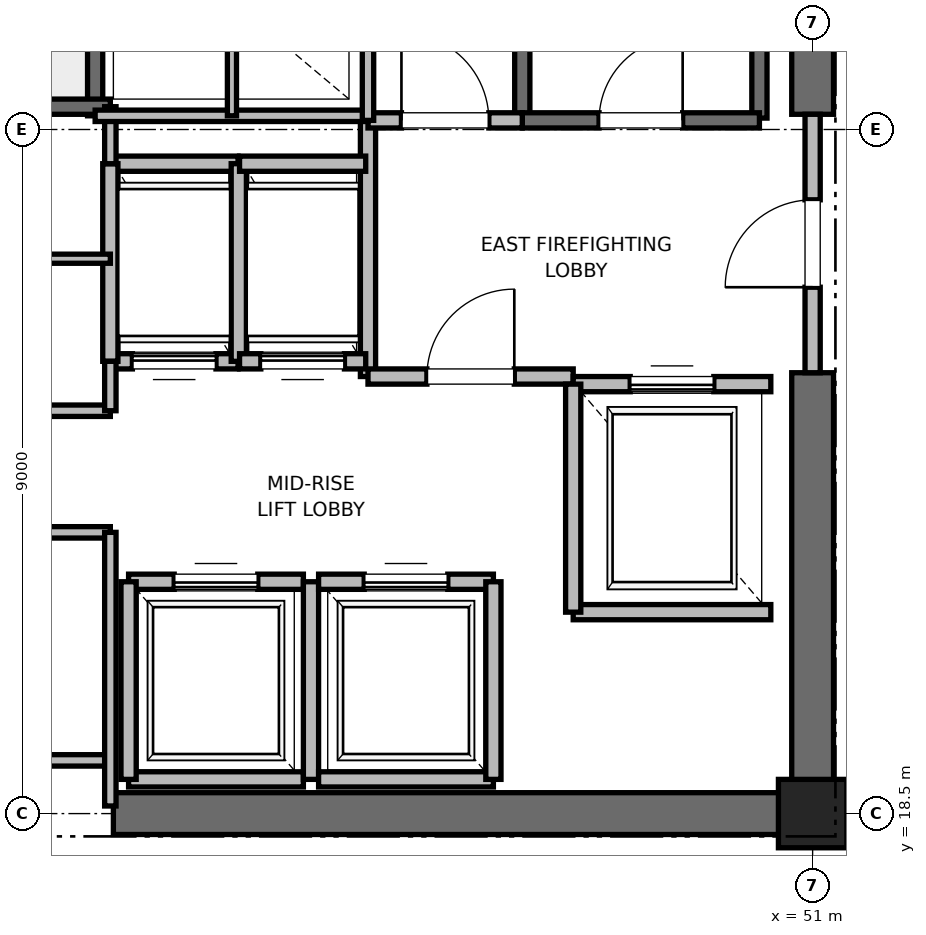
"""IFC4 building model, lengths in metres.
Left out: names, types, materials, properties, quantities, classifications, styles, units other than length and angle.
Written with IfcOpenShell. Run it as: python <this file> out.ifc"""

import sys

from ifc_helpers import new_model, si_unit, direction, frame, frame_2d, origin, origin_2d, place, context, subcontext, project, spatial, rectangle, extrude, element, fill, save


model = new_model("IFC4")
c1 = context("Model", 3, precision=1e-05, world=origin(), true_north=direction((0.0, 1.0)))
c2 = subcontext(c1, "Body", "Model", "MODEL_VIEW")
j1 = project(units=[si_unit("LENGTHUNIT", "METRE"), si_unit("PLANEANGLEUNIT", "RADIAN")], contexts=[c1])
p1 = place(None, origin())
s1 = spatial("IfcSite", under=j1, at=p1, CompositionType="ELEMENT")
p2 = place(p1, origin())
s2 = spatial("IfcBuilding", under=s1, at=p2, CompositionType="ELEMENT")
p3 = place(p2, frame((0.0, 0.0, 189.4)))
s3 = spatial("IfcBuildingStorey", under=s2, at=p3, CompositionType="ELEMENT", Elevation=189.4)
p4 = place(p3, frame((51.0, 18.5, 0.0), z_axis=(0.0, 0.0, 1.0), x_axis=(1.0, 0.0, 0.0)))
e1 = element("IfcColumn", 1, at=p4, inside=s3, PredefinedType="PILASTER", context=c2, shape_type="SweptSolid", body=[
    extrude(rectangle(XDim=0.9, YDim=0.9, at=origin_2d()), origin(), (0.0, 0.0, 1.0), 5.4),
])
p5 = place(p3, frame((41.8, 18.5, 0.0), z_axis=(0.0, 0.0, 1.0), x_axis=(1.0, 0.0, 0.0)))
e2 = element("IfcWall", 2, at=p5, inside=s3, PredefinedType="SHEAR", context=c2, shape_type="SweptSolid", body=[
    extrude(rectangle(XDim=9.2, YDim=0.55, at=frame_2d((4.6, 0.0))), origin(), (0.0, 0.0, 1.0), 5.1),
])
p6 = place(p3, frame((51.0, 18.5, 0.0), z_axis=(0.0, 0.0, 1.0), x_axis=(0.0, 1.0, 0.0)))
e3 = element("IfcWall", 3, at=p6, inside=s3, PredefinedType="SHEAR", context=c2, shape_type="SweptSolid", body=[
    extrude(rectangle(XDim=5.8, YDim=0.55, at=frame_2d((2.9, 0.0))), origin(), (0.0, 0.0, 1.0), 5.1),
])
p7 = place(p3, frame((51.0, 27.7, 0.0), z_axis=(0.0, 0.0, 1.0), x_axis=(0.0, 1.0, 0.0)))
e4 = element("IfcWall", 4, at=p7, inside=s3, PredefinedType="SHEAR", context=c2, shape_type="SweptSolid", body=[
    extrude(rectangle(XDim=8.8, YDim=0.55, at=frame_2d((4.4, 0.0))), origin(), (0.0, 0.0, 1.0), 5.1),
])
p8 = place(p3, frame((50.3, 27.65, 0.0), z_axis=(0.0, 0.0, 1.0), x_axis=(0.0, 1.0, 0.0)))
e5 = element("IfcWall", 5, at=p8, inside=s3, PredefinedType="SOLIDWALL", context=c2, shape_type="SweptSolid", body=[
    extrude(rectangle(XDim=8.15, YDim=0.2, at=frame_2d((4.075, 0.0))), origin(), (0.0, 0.0, 1.0), 5.1),
])
p9 = place(p3, frame((47.18, 27.62, 0.0), z_axis=(0.0, 0.0, 1.0), x_axis=(0.0, 1.0, 0.0)))
e6 = element("IfcWall", 6, at=p9, inside=s3, PredefinedType="SOLIDWALL", context=c2, shape_type="SweptSolid", body=[
    extrude(rectangle(XDim=8.18, YDim=0.2, at=frame_2d((4.09, 0.0))), origin(), (0.0, 0.0, 1.0), 5.1),
])
p10 = place(p3, frame((47.18, 27.62, 0.0), z_axis=(0.0, 0.0, 1.0), x_axis=(1.0, 0.0, 0.0)))
e7 = element("IfcWall", 7, at=p10, inside=s3, PredefinedType="SOLIDWALL", context=c2, shape_type="SweptSolid", body=[
    extrude(rectangle(XDim=3.12, YDim=0.2, at=frame_2d((1.56, 0.0))), origin(), (0.0, 0.0, 1.0), 5.1),
])
p11 = place(p10, frame((1.01, 0.0, 0.0)))
e8 = element("IfcOpeningElement", 8, at=p11, cuts=e7, PredefinedType="OPENING", context=c2, shape_type="SweptSolid", body=[
    extrude(rectangle(XDim=1.1, YDim=2.15, at=frame_2d((0.55, 1.075))), frame((0.0, 0.1, 0.0), z_axis=(0.0, -1.0, 0.0), x_axis=(1.0, 0.0, 0.0)), (0.0, 0.0, 1.0), 0.2),
])
p12 = place(p3, frame((41.56, 27.68, 0.0), z_axis=(0.0, 0.0, 1.0), x_axis=(0.0, 1.0, 0.0)))
e9 = element("IfcWall", 9, at=p12, inside=s3, PredefinedType="SOLIDWALL", context=c2, shape_type="SweptSolid", body=[
    extrude(rectangle(XDim=8.57, YDim=0.2, at=frame_2d((4.285, 0.0))), origin(), (0.0, 0.0, 1.0), 5.1),
])
p13 = place(p3, frame((38.44, 27.8, 0.0), z_axis=(0.0, 0.0, 1.0), x_axis=(1.0, 0.0, 0.0)))
e10 = element("IfcWall", 10, at=p13, inside=s3, PredefinedType="SOLIDWALL", context=c2, shape_type="SweptSolid", body=[
    extrude(rectangle(XDim=3.32, YDim=0.2, at=frame_2d((1.66, 0.0))), origin(), (0.0, 0.0, 1.0), 5.1),
])
p14 = place(p3, frame((45.15, 24.25, 0.0), z_axis=(0.0, 0.0, 1.0), x_axis=(0.0, 1.0, 0.0)))
e11 = element("IfcWall", 11, at=p14, inside=s3, PredefinedType="PARTITIONING", context=c2, shape_type="SweptSolid", body=[
    extrude(rectangle(XDim=3.37, YDim=0.2, at=frame_2d((1.685, 0.0))), origin(), (0.0, 0.0, 1.0), 5.1),
])
p15 = place(p3, frame((45.15, 24.25, 0.0), z_axis=(0.0, 0.0, 1.0), x_axis=(1.0, 0.0, 0.0)))
e12 = element("IfcWall", 12, at=p15, inside=s3, PredefinedType="PARTITIONING", context=c2, shape_type="SweptSolid", body=[
    extrude(rectangle(XDim=2.7, YDim=0.2, at=frame_2d((1.35, 0.0))), origin(), (0.0, 0.0, 1.0), 5.1),
])
p16 = place(p15, frame((0.775, 0.0, 0.0)))
e13 = element("IfcOpeningElement", 13, at=p16, cuts=e12, PredefinedType="OPENING", context=c2, shape_type="SweptSolid", body=[
    extrude(rectangle(XDim=1.15, YDim=2.2, at=frame_2d((0.575, 1.1))), frame((0.0, 0.1, 0.0), z_axis=(0.0, -1.0, 0.0), x_axis=(1.0, 0.0, 0.0)), (0.0, 0.0, 1.0), 0.2),
])
p17 = place(p3, frame((45.15, 27.62, 0.0), z_axis=(0.0, 0.0, 1.0), x_axis=(1.0, 0.0, 0.0)))
e14 = element("IfcWall", 14, at=p17, inside=s3, PredefinedType="PARTITIONING", context=c2, shape_type="SweptSolid", body=[
    extrude(rectangle(XDim=2.03, YDim=0.2, at=frame_2d((1.015, 0.0))), origin(), (0.0, 0.0, 1.0), 5.1),
])
p18 = place(p17, frame((0.44, 0.0, 0.0)))
e15 = element("IfcOpeningElement", 15, at=p18, cuts=e14, PredefinedType="OPENING", context=c2, shape_type="SweptSolid", body=[
    extrude(rectangle(XDim=1.15, YDim=2.2, at=frame_2d((0.575, 1.1))), frame((0.0, 0.1, 0.0), z_axis=(0.0, -1.0, 0.0), x_axis=(1.0, 0.0, 0.0)), (0.0, 0.0, 1.0), 0.2),
])
p19 = place(p3, frame((51.0, 24.3, 0.0), z_axis=(0.0, 0.0, 1.0), x_axis=(0.0, 1.0, 0.0)))
e16 = element("IfcWall", 16, at=p19, inside=s3, PredefinedType="PARTITIONING", context=c2, shape_type="SweptSolid", body=[
    extrude(rectangle(XDim=3.4, YDim=0.2, at=frame_2d((1.7, 0.0))), origin(), (0.0, 0.0, 1.0), 4.08),
])
p20 = place(p19, frame((1.125, 0.0, 0.0)))
e17 = element("IfcOpeningElement", 17, at=p20, cuts=e16, PredefinedType="OPENING", context=c2, shape_type="SweptSolid", body=[
    extrude(rectangle(XDim=1.15, YDim=2.2, at=frame_2d((0.575, 1.1))), frame((0.0, 0.1, 0.0), z_axis=(0.0, -1.0, 0.0), x_axis=(1.0, 0.0, 0.0)), (0.0, 0.0, 1.0), 0.2),
])
p21 = place(p3, frame((47.85, 21.15, 0.0), z_axis=(0.0, 0.0, 1.0), x_axis=(1.0, 0.0, 0.0)))
e18 = element("IfcWall", 18, at=p21, inside=s3, PredefinedType="SOLIDWALL", context=c2, shape_type="SweptSolid", body=[
    extrude(rectangle(XDim=2.6, YDim=0.2, at=frame_2d((1.3, 0.0))), origin(), (0.0, 0.0, 1.0), 5.1),
])
p22 = place(p3, frame((50.45, 24.15, 0.0), z_axis=(0.0, 0.0, 1.0), x_axis=(-1.0, 0.0, 0.0)))
e19 = element("IfcWall", 19, at=p22, inside=s3, PredefinedType="SOLIDWALL", context=c2, shape_type="SweptSolid", body=[
    extrude(rectangle(XDim=2.6, YDim=0.2, at=frame_2d((1.3, 0.0))), origin(), (0.0, 0.0, 1.0), 4.08),
])
p23 = place(p22, frame((0.75, 0.0, 0.0)))
e20 = element("IfcOpeningElement", 20, at=p23, cuts=e19, PredefinedType="OPENING", context=c2, shape_type="SweptSolid", body=[
    extrude(rectangle(XDim=1.1, YDim=2.2, at=frame_2d((0.55, 1.1))), frame((0.0, 0.1, 0.0), z_axis=(0.0, -1.0, 0.0), x_axis=(1.0, 0.0, 0.0)), (0.0, 0.0, 1.0), 0.2),
])
p24 = place(p3, frame((47.85, 24.15, 0.0), z_axis=(0.0, 0.0, 1.0), x_axis=(0.0, -1.0, 0.0)))
e21 = element("IfcWall", 21, at=p24, inside=s3, PredefinedType="SOLIDWALL", context=c2, shape_type="SweptSolid", body=[
    extrude(rectangle(XDim=3.0, YDim=0.2, at=frame_2d((1.5, 0.0))), origin(), (0.0, 0.0, 1.0), 5.1),
])
p25 = place(p3, frame((42.0, 18.95, 0.0), z_axis=(0.0, 0.0, 1.0), x_axis=(1.0, 0.0, 0.0)))
e22 = element("IfcWall", 22, at=p25, inside=s3, PredefinedType="SOLIDWALL", context=c2, shape_type="SweptSolid", body=[
    extrude(rectangle(XDim=2.3, YDim=0.2, at=frame_2d((1.15, 0.0))), origin(), (0.0, 0.0, 1.0), 4.08),
])
p26 = place(p3, frame((44.3, 21.55, 0.0), z_axis=(0.0, 0.0, 1.0), x_axis=(-1.0, 0.0, 0.0)))
e23 = element("IfcWall", 23, at=p26, inside=s3, PredefinedType="SOLIDWALL", context=c2, shape_type="SweptSolid", body=[
    extrude(rectangle(XDim=2.3, YDim=0.2, at=frame_2d((1.15, 0.0))), origin(), (0.0, 0.0, 1.0), 5.1),
])
p27 = place(p26, frame((0.6, 0.0, 0.0)))
e24 = element("IfcOpeningElement", 24, at=p27, cuts=e23, PredefinedType="OPENING", context=c2, shape_type="SweptSolid", body=[
    extrude(rectangle(XDim=1.1, YDim=2.2, at=frame_2d((0.55, 1.1))), frame((0.0, 0.1, 0.0), z_axis=(0.0, -1.0, 0.0), x_axis=(1.0, 0.0, 0.0)), (0.0, 0.0, 1.0), 0.2),
])
p28 = place(p3, frame((42.0, 21.55, 0.0), z_axis=(0.0, 0.0, 1.0), x_axis=(0.0, -1.0, 0.0)))
e25 = element("IfcWall", 25, at=p28, inside=s3, PredefinedType="SOLIDWALL", context=c2, shape_type="SweptSolid", body=[
    extrude(rectangle(XDim=2.6, YDim=0.2, at=frame_2d((1.3, 0.0))), origin(), (0.0, 0.0, 1.0), 4.08),
])
p29 = place(p3, frame((44.4, 18.95, 0.0), z_axis=(0.0, 0.0, 1.0), x_axis=(0.0, 1.0, 0.0)))
e26 = element("IfcWall", 26, at=p29, inside=s3, PredefinedType="SOLIDWALL", context=c2, shape_type="SweptSolid", body=[
    extrude(rectangle(XDim=2.6, YDim=0.2, at=frame_2d((1.3, 0.0))), origin(), (0.0, 0.0, 1.0), 5.1),
])
p30 = place(p3, frame((44.5, 18.95, 0.0), z_axis=(0.0, 0.0, 1.0), x_axis=(1.0, 0.0, 0.0)))
e27 = element("IfcWall", 27, at=p30, inside=s3, PredefinedType="SOLIDWALL", context=c2, shape_type="SweptSolid", body=[
    extrude(rectangle(XDim=2.3, YDim=0.2, at=frame_2d((1.15, 0.0))), origin(), (0.0, 0.0, 1.0), 5.1),
])
p31 = place(p3, frame((46.8, 21.55, 0.0), z_axis=(0.0, 0.0, 1.0), x_axis=(-1.0, 0.0, 0.0)))
e28 = element("IfcWall", 28, at=p31, inside=s3, PredefinedType="SOLIDWALL", context=c2, shape_type="SweptSolid", body=[
    extrude(rectangle(XDim=2.3, YDim=0.2, at=frame_2d((1.15, 0.0))), origin(), (0.0, 0.0, 1.0), 5.1),
])
p32 = place(p31, frame((0.6, 0.0, 0.0)))
e29 = element("IfcOpeningElement", 29, at=p32, cuts=e28, PredefinedType="OPENING", context=c2, shape_type="SweptSolid", body=[
    extrude(rectangle(XDim=1.1, YDim=2.2, at=frame_2d((0.55, 1.1))), frame((0.0, 0.1, 0.0), z_axis=(0.0, -1.0, 0.0), x_axis=(1.0, 0.0, 0.0)), (0.0, 0.0, 1.0), 0.2),
])
p33 = place(p3, frame((46.8, 18.95, 0.0), z_axis=(0.0, 0.0, 1.0), x_axis=(0.0, 1.0, 0.0)))
e30 = element("IfcWall", 30, at=p33, inside=s3, PredefinedType="SOLIDWALL", context=c2, shape_type="SweptSolid", body=[
    extrude(rectangle(XDim=2.6, YDim=0.2, at=frame_2d((1.3, 0.0))), origin(), (0.0, 0.0, 1.0), 5.1),
])
p34 = place(p3, frame((41.76, 24.45, 0.0), z_axis=(0.0, 0.0, 1.0), x_axis=(1.0, 0.0, 0.0)))
e31 = element("IfcWall", 31, at=p34, inside=s3, PredefinedType="SOLIDWALL", context=c2, shape_type="SweptSolid", body=[
    extrude(rectangle(XDim=1.68, YDim=0.2, at=frame_2d((0.84, 0.0))), origin(), (0.0, 0.0, 1.0), 5.1),
])
p35 = place(p34, frame((0.29, 0.0, 0.0)))
e32 = element("IfcOpeningElement", 32, at=p35, cuts=e31, PredefinedType="OPENING", context=c2, shape_type="SweptSolid", body=[
    extrude(rectangle(XDim=1.1, YDim=2.2, at=frame_2d((0.55, 1.1))), frame((0.0, 0.1, 0.0), z_axis=(0.0, -1.0, 0.0), x_axis=(1.0, 0.0, 0.0)), (0.0, 0.0, 1.0), 0.2),
])
p36 = place(p3, frame((43.44, 27.05, 0.0), z_axis=(0.0, 0.0, 1.0), x_axis=(-1.0, 0.0, 0.0)))
e33 = element("IfcWall", 33, at=p36, inside=s3, PredefinedType="SOLIDWALL", context=c2, shape_type="SweptSolid", body=[
    extrude(rectangle(XDim=1.68, YDim=0.2, at=frame_2d((0.84, 0.0))), origin(), (0.0, 0.0, 1.0), 5.1),
])
for number, where, z_axis, x_axis in (
    (34, (41.76, 27.05, 0.0), (0.0, 0.0, 1.0), (0.0, -1.0, 0.0)),
    (35, (43.45, 24.45, 0.0), (0.0, 0.0, 1.0), (0.0, 1.0, 0.0)),
):
    element("IfcWall", number, at=place(p3, frame(where, z_axis=z_axis, x_axis=x_axis)), inside=s3, PredefinedType="SOLIDWALL", context=c2, shape_type="SweptSolid", body=[
        extrude(rectangle(XDim=2.6, YDim=0.2, at=frame_2d((1.3, 0.0))), origin(), (0.0, 0.0, 1.0), 5.1),
    ])
p37 = place(p3, frame((43.46, 24.45, 0.0), z_axis=(0.0, 0.0, 1.0), x_axis=(1.0, 0.0, 0.0)))
e36 = element("IfcWall", 36, at=p37, inside=s3, PredefinedType="SOLIDWALL", context=c2, shape_type="SweptSolid", body=[
    extrude(rectangle(XDim=1.66, YDim=0.2, at=frame_2d((0.83, 0.0))), origin(), (0.0, 0.0, 1.0), 5.1),
])
p38 = place(p37, frame((0.28, 0.0, 0.0)))
e37 = element("IfcOpeningElement", 37, at=p38, cuts=e36, PredefinedType="OPENING", context=c2, shape_type="SweptSolid", body=[
    extrude(rectangle(XDim=1.1, YDim=2.2, at=frame_2d((0.55, 1.1))), frame((0.0, 0.1, 0.0), z_axis=(0.0, -1.0, 0.0), x_axis=(1.0, 0.0, 0.0)), (0.0, 0.0, 1.0), 0.2),
])
p39 = place(p3, frame((45.12, 27.05, 0.0), z_axis=(0.0, 0.0, 1.0), x_axis=(-1.0, 0.0, 0.0)))
e38 = element("IfcWall", 38, at=p39, inside=s3, PredefinedType="SOLIDWALL", context=c2, shape_type="SweptSolid", body=[
    extrude(rectangle(XDim=1.66, YDim=0.2, at=frame_2d((0.83, 0.0))), origin(), (0.0, 0.0, 1.0), 5.1),
])
for number, where, z_axis, x_axis in (
    (39, (39.95, 19.2, 0.0), (0.0, 0.0, 1.0), (1.0, 0.0, 0.0)),
    (40, (39.95, 22.2, 0.0), (0.0, 0.0, 1.0), (1.0, 0.0, 0.0)),
    (41, (39.95, 23.8, 0.0), (0.0, 0.0, 1.0), (1.0, 0.0, 0.0)),
):
    element("IfcWall", number, at=place(p3, frame(where, z_axis=z_axis, x_axis=x_axis)), inside=s3, PredefinedType="PARTITIONING", context=c2, shape_type="SweptSolid", body=[
        extrude(rectangle(XDim=1.81, YDim=0.15, at=frame_2d((0.905, 0.0))), origin(), (0.0, 0.0, 1.0), 2.85),
    ])
p40 = place(p3, frame((39.95, 25.8, 0.0), z_axis=(0.0, 0.0, 1.0), x_axis=(1.0, 0.0, 0.0)))
e42 = element("IfcWall", 42, at=p40, inside=s3, PredefinedType="PARTITIONING", context=c2, shape_type="SweptSolid", body=[
    extrude(rectangle(XDim=1.81, YDim=0.12, at=frame_2d((0.905, 0.0))), origin(), (0.0, 0.0, 1.0), 2.85),
])
p41 = place(p3, frame((41.76, 18.6, 0.0), z_axis=(0.0, 0.0, 1.0), x_axis=(0.0, 1.0, 0.0)))
e43 = element("IfcWall", 43, at=p41, inside=s3, PredefinedType="PARTITIONING", context=c2, shape_type="SweptSolid", body=[
    extrude(rectangle(XDim=3.6, YDim=0.15, at=frame_2d((1.8, 0.0))), origin(), (0.0, 0.0, 1.0), 2.85),
])
p42 = place(p3, frame((41.76, 23.8, 0.0), z_axis=(0.0, 0.0, 1.0), x_axis=(0.0, 1.0, 0.0)))
e44 = element("IfcWall", 44, at=p42, inside=s3, PredefinedType="PARTITIONING", context=c2, shape_type="SweptSolid", body=[
    extrude(rectangle(XDim=0.65, YDim=0.15, at=frame_2d((0.325, 0.0))), origin(), (0.0, 0.0, 1.0), 2.85),
])
p43 = place(p3, frame((41.76, 27.05, 0.0), z_axis=(0.0, 0.0, 1.0), x_axis=(0.0, 1.0, 0.0)))
e45 = element("IfcWall", 45, at=p43, inside=s3, PredefinedType="PARTITIONING", context=c2, shape_type="SweptSolid", body=[
    extrude(rectangle(XDim=0.75, YDim=0.15, at=frame_2d((0.375, 0.0))), origin(), (0.0, 0.0, 1.0), 2.85),
])
p44 = place(p3, frame((41.56, 27.68, 0.0), z_axis=(0.0, 0.0, 1.0), x_axis=(1.0, 0.0, 0.0)))
e46 = element("IfcWall", 46, at=p44, inside=s3, PredefinedType="PARTITIONING", context=c2, shape_type="SweptSolid", body=[
    extrude(rectangle(XDim=3.59, YDim=0.15, at=frame_2d((1.795, 0.0))), origin(), (0.0, 0.0, 1.0), 2.85),
])
p45 = place(p3, frame((45.15, 27.62, 0.0), z_axis=(0.0, 0.0, 1.0), x_axis=(0.0, 1.0, 0.0)))
e47 = element("IfcWall", 47, at=p45, inside=s3, PredefinedType="PARTITIONING", context=c2, shape_type="SweptSolid", body=[
    extrude(rectangle(XDim=3.1, YDim=0.15, at=frame_2d((1.55, 0.0))), origin(), (0.0, 0.0, 1.0), 2.85),
])
p46 = place(p3, frame((43.36, 27.68, 0.0), z_axis=(0.0, 0.0, 1.0), x_axis=(0.0, 1.0, 0.0)))
e48 = element("IfcWall", 48, at=p46, inside=s3, PredefinedType="PARTITIONING", context=c2, shape_type="SweptSolid", body=[
    extrude(rectangle(XDim=3.04, YDim=0.12, at=frame_2d((1.52, 0.0))), origin(), (0.0, 0.0, 1.0), 2.85),
])
p47 = place(p11, origin())
e49 = element("IfcDoor", 49, at=p47, inside=s3, OperationType="SINGLE_SWING_RIGHT", PredefinedType="DOOR", context=c2, shape_type="SweptSolid", body=[
    extrude(rectangle(XDim=1.1, YDim=2.15, at=frame_2d((0.55, 1.075))), frame((0.0, 0.025, 0.0), z_axis=(0.0, -1.0, 0.0), x_axis=(1.0, 0.0, 0.0)), (0.0, 0.0, 1.0), 0.05),
])
fill(e8, e49)
p48 = place(p16, origin())
e50 = element("IfcDoor", 50, at=p48, inside=s3, OperationType="SINGLE_SWING_RIGHT", PredefinedType="DOOR", context=c2, shape_type="SweptSolid", body=[
    extrude(rectangle(XDim=1.15, YDim=2.2, at=frame_2d((0.575, 1.1))), frame((0.0, 0.025, 0.0), z_axis=(0.0, -1.0, 0.0), x_axis=(1.0, 0.0, 0.0)), (0.0, 0.0, 1.0), 0.05),
])
fill(e13, e50)
p49 = place(p18, origin())
e51 = element("IfcDoor", 51, at=p49, inside=s3, OperationType="SINGLE_SWING_LEFT", PredefinedType="DOOR", context=c2, shape_type="SweptSolid", body=[
    extrude(rectangle(XDim=1.15, YDim=2.2, at=frame_2d((0.575, 1.1))), frame((0.0, 0.025, 0.0), z_axis=(0.0, -1.0, 0.0), x_axis=(1.0, 0.0, 0.0)), (0.0, 0.0, 1.0), 0.05),
])
fill(e15, e51)
p50 = place(p20, origin())
e52 = element("IfcDoor", 52, at=p50, inside=s3, OperationType="SINGLE_SWING_LEFT", PredefinedType="DOOR", context=c2, shape_type="SweptSolid", body=[
    extrude(rectangle(XDim=1.15, YDim=2.2, at=frame_2d((0.575, 1.1))), frame((0.0, 0.025, 0.0), z_axis=(0.0, -1.0, 0.0), x_axis=(1.0, 0.0, 0.0)), (0.0, 0.0, 1.0), 0.05),
])
fill(e17, e52)
p51 = place(p23, origin())
e53 = element("IfcDoor", 53, at=p51, inside=s3, OperationType="SLIDING_TO_RIGHT", PredefinedType="DOOR", context=c2, shape_type="SweptSolid", body=[
    extrude(rectangle(XDim=1.1, YDim=2.2, at=frame_2d((0.55, 1.1))), frame((0.0, 0.025, 0.0), z_axis=(0.0, -1.0, 0.0), x_axis=(1.0, 0.0, 0.0)), (0.0, 0.0, 1.0), 0.05),
])
fill(e20, e53)
p52 = place(p27, origin())
e54 = element("IfcDoor", 54, at=p52, inside=s3, OperationType="SLIDING_TO_RIGHT", PredefinedType="DOOR", context=c2, shape_type="SweptSolid", body=[
    extrude(rectangle(XDim=1.1, YDim=2.2, at=frame_2d((0.55, 1.1))), frame((0.0, 0.025, 0.0), z_axis=(0.0, -1.0, 0.0), x_axis=(1.0, 0.0, 0.0)), (0.0, 0.0, 1.0), 0.05),
])
fill(e24, e54)
p53 = place(p32, origin())
e55 = element("IfcDoor", 55, at=p53, inside=s3, OperationType="SLIDING_TO_RIGHT", PredefinedType="DOOR", context=c2, shape_type="SweptSolid", body=[
    extrude(rectangle(XDim=1.1, YDim=2.2, at=frame_2d((0.55, 1.1))), frame((0.0, 0.025, 0.0), z_axis=(0.0, -1.0, 0.0), x_axis=(1.0, 0.0, 0.0)), (0.0, 0.0, 1.0), 0.05),
])
fill(e29, e55)
p54 = place(p35, origin())
e56 = element("IfcDoor", 56, at=p54, inside=s3, OperationType="SLIDING_TO_RIGHT", PredefinedType="DOOR", context=c2, shape_type="SweptSolid", body=[
    extrude(rectangle(XDim=1.1, YDim=2.2, at=frame_2d((0.55, 1.1))), frame((0.0, 0.025, 0.0), z_axis=(0.0, -1.0, 0.0), x_axis=(1.0, 0.0, 0.0)), (0.0, 0.0, 1.0), 0.05),
])
fill(e32, e56)
p55 = place(p38, origin())
e57 = element("IfcDoor", 57, at=p55, inside=s3, OperationType="SLIDING_TO_RIGHT", PredefinedType="DOOR", context=c2, shape_type="SweptSolid", body=[
    extrude(rectangle(XDim=1.1, YDim=2.2, at=frame_2d((0.55, 1.1))), frame((0.0, 0.025, 0.0), z_axis=(0.0, -1.0, 0.0), x_axis=(1.0, 0.0, 0.0)), (0.0, 0.0, 1.0), 0.05),
])
fill(e37, e57)
save(model, sys.argv[1])
